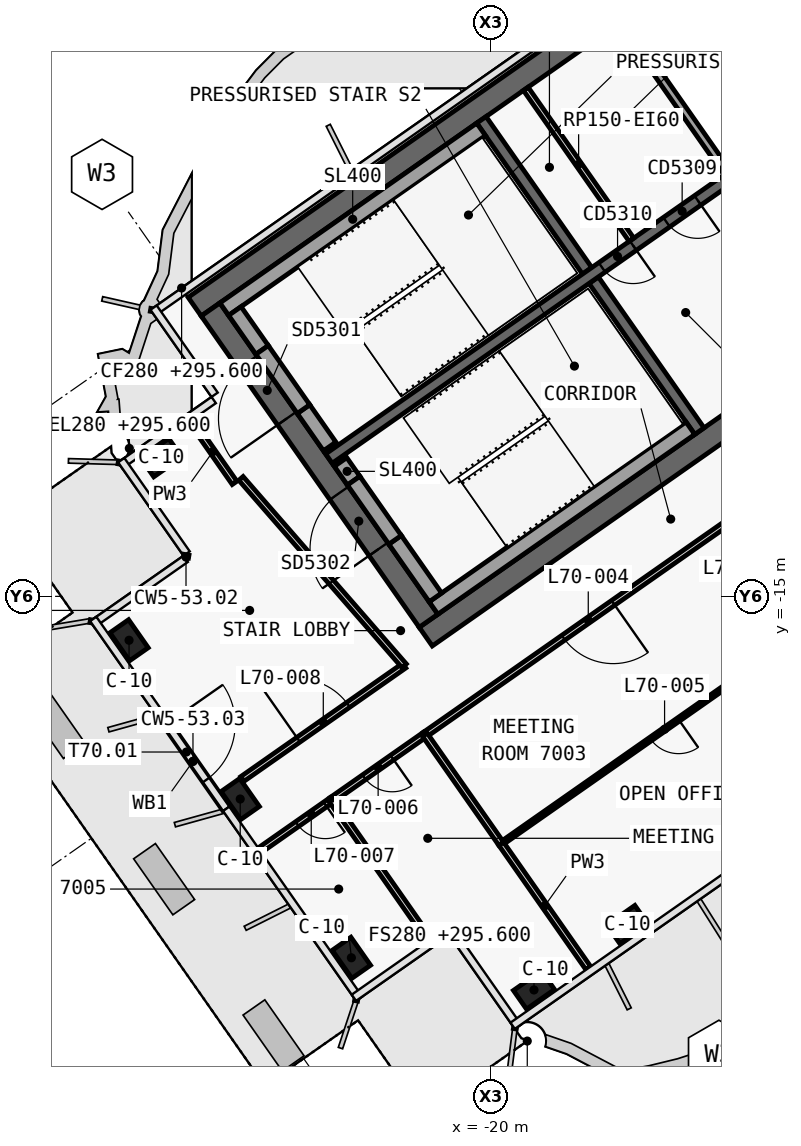
"""IFC4 building model, lengths in metres.
Left out: names, types, materials, properties, quantities, classifications, styles, units other than length and angle.
Written with IfcOpenShell. Run it as: python <this file> out.ifc"""

import sys

from ifc_helpers import new_model, si_unit, direction, frame, frame_2d, origin, origin_2d, place, context, subcontext, project, spatial, polyline, rectangle, outline, extrude, element, fill, save


model = new_model("IFC4")
c1 = context("Model", 3, precision=1e-05, world=origin(), true_north=direction((0.0, 1.0)))
c2 = subcontext(c1, "Body", "Model", "MODEL_VIEW")
j1 = project(units=[si_unit("LENGTHUNIT", "METRE"), si_unit("PLANEANGLEUNIT", "RADIAN")], contexts=[c1])
p1 = place(None, origin())
s1 = spatial("IfcSite", under=j1, at=p1, CompositionType="ELEMENT")
p2 = place(p1, origin())
s2 = spatial("IfcBuilding", under=s1, at=p2, CompositionType="ELEMENT")
p3 = place(p2, frame((0.0, 0.0, 295.6)))
s3 = spatial("IfcBuildingStorey", under=s2, at=p3, CompositionType="ELEMENT", Elevation=295.6)
p4 = place(p3, frame((-0.028, 12.066, 0.0), z_axis=(0.0, 0.0, 1.0), x_axis=(-0.819151382952, -0.573577380837, 0.0)))
e1 = element("IfcWall", 1, at=p4, inside=s3, PredefinedType="SHEAR", context=c2, shape_type="SweptSolid", body=[
    extrude(outline(polyline([(33.898, 0.3), (0.42, 0.3), (0.0, -0.3), (33.898, -0.3), (33.898, 0.3)])), origin(), (0.0, 0.0, 1.0), 3.9),
])
p5 = place(p3, frame((-0.028, -0.874, 0.0), z_axis=(0.0, 0.0, 1.0), x_axis=(-0.819150035022, -0.573579305871, 0.0)))
e2 = element("IfcWall", 2, at=p5, inside=s3, PredefinedType="SHEAR", context=c2, shape_type="SweptSolid", body=[
    extrude(outline(polyline([(26.476, 0.3), (0.42, 0.3), (0.0, -0.3), (26.476, -0.3), (26.476, 0.3)])), origin(), (0.0, 0.0, 1.0), 3.9),
])
p6 = place(p5, frame((2.976, 0.0, 0.0)))
e3 = element("IfcOpeningElement", 3, at=p6, cuts=e2, PredefinedType="OPENING", context=c2, shape_type="SweptSolid", body=[
    extrude(rectangle(XDim=2.4, YDim=2.1, at=frame_2d((1.2, 1.05))), frame((0.0, 0.31, 0.0), z_axis=(0.0, -1.0, 0.0), x_axis=(1.0, 0.0, 0.0)), (0.0, 0.0, 1.0), 0.62),
])
p7 = place(p5, frame((11.776, 0.0, 0.0)))
e4 = element("IfcOpeningElement", 4, at=p7, cuts=e2, PredefinedType="OPENING", context=c2, shape_type="SweptSolid", body=[
    extrude(rectangle(XDim=2.4, YDim=2.1, at=frame_2d((1.2, 1.05))), frame((0.0, 0.31, 0.0), z_axis=(0.0, -1.0, 0.0), x_axis=(1.0, 0.0, 0.0)), (0.0, 0.0, 1.0), 0.62),
])
p8 = place(p3, frame((-21.642, -15.642, 0.0), z_axis=(0.0, 0.0, 1.0), x_axis=(-0.573586866468, 0.819144740944, 0.0)))
e5 = element("IfcWall", 5, at=p8, inside=s3, PredefinedType="SHEAR", context=c2, shape_type="SweptSolid", body=[
    extrude(outline(polyline([(0.0, 0.3), (0.0, -0.3), (10.0, -0.3), (10.0, 0.3), (0.0, 0.3)])), origin(), (0.0, 0.0, 1.0), 3.9),
])
p9 = place(p8, frame((6.5, 0.0, 0.0)))
e6 = element("IfcOpeningElement", 6, at=p9, cuts=e5, PredefinedType="OPENING", context=c2, shape_type="SweptSolid", body=[
    extrude(rectangle(XDim=1.8, YDim=2.1, at=frame_2d((0.9, 1.05))), frame((0.0, 0.31, 0.0), z_axis=(0.0, -1.0, 0.0), x_axis=(1.0, 0.0, 0.0)), (0.0, 0.0, 1.0), 0.62),
])
p10 = place(p8, frame((2.3, 0.0, 0.0)))
e7 = element("IfcOpeningElement", 7, at=p10, cuts=e5, PredefinedType="OPENING", context=c2, shape_type="SweptSolid", body=[
    extrude(rectangle(XDim=1.8, YDim=2.1, at=frame_2d((0.9, 1.05))), frame((0.0, 0.31, 0.0), z_axis=(0.0, -1.0, 0.0), x_axis=(1.0, 0.0, 0.0)), (0.0, 0.0, 1.0), 0.62),
])
p11 = place(p3, frame((-14.515, -10.652, 0.0), z_axis=(0.0, 0.0, 1.0), x_axis=(-0.573560315113, 0.819163332265, 0.0)))
e8 = element("IfcWall", 8, at=p11, inside=s3, PredefinedType="SHEAR", context=c2, shape_type="SweptSolid", body=[
    extrude(outline(polyline([(4.85, 0.15), (0.0, 0.15), (0.0, -0.15), (4.85, -0.15), (4.85, 0.15)])), origin(), (0.0, 0.0, 1.0), 3.9),
])
p12 = place(p3, frame((-17.469, -6.433, 0.0), z_axis=(0.0, 0.0, 1.0), x_axis=(-0.573594092424, 0.81913968109, 0.0)))
e9 = element("IfcWall", 9, at=p12, inside=s3, PredefinedType="SHEAR", context=c2, shape_type="SweptSolid", body=[
    extrude(outline(polyline([(4.85, -0.15), (4.85, 0.15), (0.0, 0.15), (0.0, -0.15), (4.85, -0.15)])), origin(), (0.0, 0.0, 1.0), 3.9),
])
p13 = place(p3, frame((-2.638, 3.768, 0.0), z_axis=(0.0, 0.0, 1.0), x_axis=(-0.819155014212, -0.573572194837, 0.0)))
e10 = element("IfcWall", 10, at=p13, inside=s3, PredefinedType="SHEAR", context=c2, shape_type="SweptSolid", body=[
    extrude(outline(polyline([(26.4, 0.15), (0.0, 0.15), (0.0, -0.15), (26.4, -0.15), (26.4, 0.15)])), origin(), (0.0, 0.0, 1.0), 3.9),
])
p14 = place(p13, frame((1.169, 0.0, 0.0)))
e11 = element("IfcOpeningElement", 11, at=p14, cuts=e10, PredefinedType="OPENING", context=c2, shape_type="SweptSolid", body=[
    extrude(rectangle(XDim=1.1, YDim=2.1, at=frame_2d((0.55, 1.05))), frame((0.0, 0.16, 0.0), z_axis=(0.0, -1.0, 0.0), x_axis=(1.0, 0.0, 0.0)), (0.0, 0.0, 1.0), 0.32),
])
p15 = place(p13, frame((3.206, 0.0, 0.0)))
e12 = element("IfcOpeningElement", 12, at=p15, cuts=e10, PredefinedType="OPENING", context=c2, shape_type="SweptSolid", body=[
    extrude(rectangle(XDim=1.1, YDim=2.1, at=frame_2d((0.55, 1.05))), frame((0.0, 0.16, 0.0), z_axis=(0.0, -1.0, 0.0), x_axis=(1.0, 0.0, 0.0)), (0.0, 0.0, 1.0), 0.32),
])
p16 = place(p13, frame((5.244, 0.0, 0.0)))
e13 = element("IfcOpeningElement", 13, at=p16, cuts=e10, PredefinedType="OPENING", context=c2, shape_type="SweptSolid", body=[
    extrude(rectangle(XDim=1.1, YDim=2.1, at=frame_2d((0.55, 1.05))), frame((0.0, 0.16, 0.0), z_axis=(0.0, -1.0, 0.0), x_axis=(1.0, 0.0, 0.0)), (0.0, 0.0, 1.0), 0.32),
])
p17 = place(p13, frame((7.281, 0.0, 0.0)))
e14 = element("IfcOpeningElement", 14, at=p17, cuts=e10, PredefinedType="OPENING", context=c2, shape_type="SweptSolid", body=[
    extrude(rectangle(XDim=1.1, YDim=2.1, at=frame_2d((0.55, 1.05))), frame((0.0, 0.16, 0.0), z_axis=(0.0, -1.0, 0.0), x_axis=(1.0, 0.0, 0.0)), (0.0, 0.0, 1.0), 0.32),
])
p18 = place(p13, frame((9.688, 0.0, 0.0)))
e15 = element("IfcOpeningElement", 15, at=p18, cuts=e10, PredefinedType="OPENING", context=c2, shape_type="SweptSolid", body=[
    extrude(rectangle(XDim=1.1, YDim=2.1, at=frame_2d((0.55, 1.05))), frame((0.0, 0.16, 0.0), z_axis=(0.0, -1.0, 0.0), x_axis=(1.0, 0.0, 0.0)), (0.0, 0.0, 1.0), 0.32),
])
p19 = place(p13, frame((11.863, 0.0, 0.0)))
e16 = element("IfcOpeningElement", 16, at=p19, cuts=e10, PredefinedType="OPENING", context=c2, shape_type="SweptSolid", body=[
    extrude(rectangle(XDim=1.1, YDim=2.1, at=frame_2d((0.55, 1.05))), frame((0.0, 0.16, 0.0), z_axis=(0.0, -1.0, 0.0), x_axis=(1.0, 0.0, 0.0)), (0.0, 0.0, 1.0), 0.32),
])
p20 = place(p13, frame((14.552, 0.0, 0.0)))
e17 = element("IfcOpeningElement", 17, at=p20, cuts=e10, PredefinedType="OPENING", context=c2, shape_type="SweptSolid", body=[
    extrude(rectangle(XDim=1.0, YDim=2.1, at=frame_2d((0.5, 1.05))), frame((0.0, 0.16, 0.0), z_axis=(0.0, -1.0, 0.0), x_axis=(1.0, 0.0, 0.0)), (0.0, 0.0, 1.0), 0.32),
])
p21 = place(p13, frame((16.627, 0.0, 0.0)))
e18 = element("IfcOpeningElement", 18, at=p21, cuts=e10, PredefinedType="OPENING", context=c2, shape_type="SweptSolid", body=[
    extrude(rectangle(XDim=1.0, YDim=2.1, at=frame_2d((0.5, 1.05))), frame((0.0, 0.16, 0.0), z_axis=(0.0, -1.0, 0.0), x_axis=(1.0, 0.0, 0.0)), (0.0, 0.0, 1.0), 0.32),
])
for number, where, z_axis, x_axis in (
    (19, (-16.41, -23.637, 0.0), (0.0, 0.0, 1.0), (-0.819, -0.574, 0.0)),
    (20, (-18.867, -25.358, 0.0), (0.0, 0.0, 1.0), (-0.819, -0.574, 0.0)),
    (21, (-28.676, -11.35, 0.0), (0.0, 0.0, 1.0), (-0.819, -0.574, 0.0)),
    (22, (-23.672, -24.51, 0.0), (0.0, 0.0, 1.0), (-0.574, 0.819, 0.0)),
    (23, (-26.598, -20.333, 0.0), (0.0, 0.0, 1.0), (-0.574, 0.819, 0.0)),
    (24, (-29.523, -16.155, 0.0), (0.0, 0.0, 1.0), (-0.574, 0.819, 0.0)),
):
    element("IfcColumn", number, at=place(p3, frame(where, z_axis=z_axis, x_axis=x_axis)), inside=s3, PredefinedType="COLUMN", context=c2, shape_type="SweptSolid", body=[
        extrude(rectangle(XDim=0.9, YDim=0.6, at=origin_2d()), origin(), (0.0, 0.0, 1.0), 3.9),
    ])
p22 = place(p3, frame((-16.302, -5.616, 0.0), z_axis=(0.0, 0.0, 1.0), x_axis=(-0.573560315113, 0.819163332265, 0.0)))
e25 = element("IfcWall", 25, at=p22, inside=s3, PredefinedType="PARTITIONING", context=c2, shape_type="SweptSolid", body=[
    extrude(rectangle(XDim=4.85, YDim=0.15, at=frame_2d((2.425, 0.0))), origin(), (0.0, 0.0, 1.0), 3.62),
])
p23 = place(p3, frame((-12.001, -2.605, 0.0), z_axis=(0.0, 0.0, 1.0), x_axis=(-0.573560315113, 0.819163332265, 0.0)))
e26 = element("IfcWall", 26, at=p23, inside=s3, PredefinedType="SOLIDWALL", context=c2, shape_type="SweptSolid", body=[
    extrude(rectangle(XDim=4.85, YDim=0.2, at=frame_2d((2.425, 0.0))), origin(), (0.0, 0.0, 1.0), 3.9),
])
p24 = place(p3, frame((-13.783, -3.852, 0.0), z_axis=(0.0, 0.0, 1.0), x_axis=(-0.573594092424, 0.81913968109, 0.0)))
e27 = element("IfcWall", 27, at=p24, inside=s3, PredefinedType="SOLIDWALL", context=c2, shape_type="SweptSolid", body=[
    extrude(rectangle(XDim=4.85, YDim=0.2, at=frame_2d((2.425, 0.0))), origin(), (0.0, 0.0, 1.0), 3.9),
])
p25 = place(p3, frame((-20.259, -2.71, 0.0), z_axis=(0.0, 0.0, 1.0), x_axis=(-0.81914849389, -0.573581506813, 0.0)))
e28 = element("IfcWall", 28, at=p25, inside=s3, PredefinedType="SOLIDWALL", context=c2, shape_type="SweptSolid", body=[
    extrude(rectangle(XDim=8.25, YDim=0.4, at=frame_2d((4.125, 0.0))), origin(), (0.0, 0.0, 1.0), 3.62),
])
p26 = place(p3, frame((-24.244, -11.055, 0.0), z_axis=(0.0, 0.0, 1.0), x_axis=(-0.573571582932, 0.819155442668, 0.0)))
e29 = element("IfcWall", 29, at=p26, inside=s3, PredefinedType="SOLIDWALL", context=c2, shape_type="SweptSolid", body=[
    extrude(rectangle(XDim=1.2, YDim=0.4, at=frame_2d((0.6, 0.0))), origin(), (0.0, 0.0, 1.0), 3.62),
])
p27 = place(p3, frame((-26.022, -8.515, 0.0), z_axis=(0.0, 0.0, 1.0), x_axis=(-0.573619628835, 0.819121798889, 0.0)))
e30 = element("IfcWall", 30, at=p27, inside=s3, PredefinedType="SOLIDWALL", context=c2, shape_type="SweptSolid", body=[
    extrude(rectangle(XDim=1.25, YDim=0.4, at=frame_2d((0.625, 0.0))), origin(), (0.0, 0.0, 1.0), 3.62),
])
p28 = place(p3, frame((-24.932, -10.072, 2.15), z_axis=(0.0, 0.0, 1.0), x_axis=(-0.573591692345, 0.819141361715, 0.0)))
e31 = element("IfcWall", 31, at=p28, inside=s3, PredefinedType="SOLIDWALL", context=c2, shape_type="SweptSolid", body=[
    extrude(rectangle(XDim=1.9, YDim=0.4, at=frame_2d((0.95, 0.0))), origin(), (0.0, 0.0, 1.0), 1.47),
])
p29 = place(p3, frame((-14.753, -10.574, 0.0), z_axis=(0.0, 0.0, 1.0), x_axis=(-0.819158229677, -0.573567602601, 0.0)))
e32 = element("IfcWall", 32, at=p29, inside=s3, PredefinedType="SOLIDWALL", context=c2, shape_type="SweptSolid", body=[
    extrude(rectangle(XDim=8.25, YDim=0.4, at=frame_2d((4.125, 0.0))), origin(), (0.0, 0.0, 1.0), 3.62),
])
p30 = place(p3, frame((-21.462, -15.028, 0.0), z_axis=(0.0, 0.0, 1.0), x_axis=(-0.573559770908, 0.819163713305, 0.0)))
e33 = element("IfcWall", 33, at=p30, inside=s3, PredefinedType="SOLIDWALL", context=c2, shape_type="SweptSolid", body=[
    extrude(rectangle(XDim=1.85, YDim=0.4, at=frame_2d((0.925, 0.0))), origin(), (0.0, 0.0, 1.0), 3.62),
])
p31 = place(p3, frame((-23.613, -11.956, 0.0), z_axis=(0.0, 0.0, 1.0), x_axis=(-0.573435029941, 0.819251039936, 0.0)))
e34 = element("IfcWall", 34, at=p31, inside=s3, PredefinedType="SOLIDWALL", context=c2, shape_type="SweptSolid", body=[
    extrude(rectangle(XDim=0.6, YDim=0.4, at=frame_2d((0.3, 0.0))), origin(), (0.0, 0.0, 1.0), 3.62),
])
p32 = place(p3, frame((-22.523, -13.512, 2.15), z_axis=(0.0, 0.0, 1.0), x_axis=(-0.573591692345, 0.819141361715, 0.0)))
e35 = element("IfcWall", 35, at=p32, inside=s3, PredefinedType="SOLIDWALL", context=c2, shape_type="SweptSolid", body=[
    extrude(rectangle(XDim=1.9, YDim=0.4, at=frame_2d((0.95, 0.0))), origin(), (0.0, 0.0, 1.0), 1.47),
])
p33 = place(p3, frame((-28.698, -18.117, 0.0), z_axis=(0.0, 0.0, 1.0), x_axis=(0.57360481557, -0.819132172213, 0.0)))
e36 = element("IfcWall", 36, at=p33, inside=s3, PredefinedType="SOLIDWALL", context=c2, shape_type="SweptSolid", body=[
    extrude(rectangle(XDim=2.99, YDim=0.2, at=frame_2d((1.495, 0.0))), origin(), (0.0, 0.0, 1.0), 3.62),
])
p34 = place(p33, frame((0.295, 0.0, 0.0)))
e37 = element("IfcOpeningElement", 37, at=p34, cuts=e36, PredefinedType="OPENING", context=c2, shape_type="SweptSolid", body=[
    extrude(rectangle(XDim=1.8, YDim=2.4, at=frame_2d((0.9, 1.2))), frame((0.0, 0.11, 0.0), z_axis=(0.0, -1.0, 0.0), x_axis=(1.0, 0.0, 0.0)), (0.0, 0.0, 1.0), 0.22),
])
p35 = place(p3, frame((-26.54, -19.804, 0.0), z_axis=(0.0, 0.0, 1.0), x_axis=(0.819163496387, 0.573560080713, 0.0)))
e38 = element("IfcWall", 38, at=p35, inside=s3, PredefinedType="PARTITIONING", context=c2, shape_type="SweptSolid", body=[
    extrude(rectangle(XDim=5.197, YDim=0.15, at=frame_2d((2.598, 0.0))), origin(), (0.0, 0.0, 1.0), 3.05),
])
p36 = place(p35, frame((1.799, 0.0, 0.0)))
e39 = element("IfcOpeningElement", 39, at=p36, cuts=e38, PredefinedType="OPENING", context=c2, shape_type="SweptSolid", body=[
    extrude(rectangle(XDim=1.6, YDim=2.1, at=frame_2d((0.8, 1.05))), frame((0.0, 0.085, 0.0), z_axis=(0.0, -1.0, 0.0), x_axis=(1.0, 0.0, 0.0)), (0.0, 0.0, 1.0), 0.17),
])
p37 = place(p3, frame((-13.137, -12.617, 0.0), z_axis=(0.0, 0.0, 1.0), x_axis=(-0.819156568366, -0.573569975245, 0.0)))
e40 = element("IfcWall", 40, at=p37, inside=s3, PredefinedType="PARTITIONING", context=c2, shape_type="SweptSolid", body=[
    extrude(rectangle(XDim=10.504, YDim=0.15, at=frame_2d((5.252, 0.0))), origin(), (0.0, 0.0, 1.0), 3.05),
])
p38 = place(p37, frame((4.452, 0.0, 0.0)))
e41 = element("IfcOpeningElement", 41, at=p38, cuts=e40, PredefinedType="OPENING", context=c2, shape_type="SweptSolid", body=[
    extrude(rectangle(XDim=1.6, YDim=2.1, at=frame_2d((0.8, 1.05))), frame((0.0, 0.085, 0.0), z_axis=(0.0, -1.0, 0.0), x_axis=(1.0, 0.0, 0.0)), (0.0, 0.0, 1.0), 0.17),
])
p39 = place(p3, frame((-21.738, -18.639, 0.0), z_axis=(0.0, 0.0, 1.0), x_axis=(-0.81916700466, -0.573555070134, 0.0)))
e42 = element("IfcWall", 42, at=p39, inside=s3, PredefinedType="PARTITIONING", context=c2, shape_type="SweptSolid", body=[
    extrude(rectangle(XDim=3.004, YDim=0.15, at=frame_2d((1.502, 0.0))), origin(), (0.0, 0.0, 1.0), 3.05),
])
p40 = place(p39, frame((1.052, 0.0, 0.0)))
e43 = element("IfcOpeningElement", 43, at=p40, cuts=e42, PredefinedType="OPENING", context=c2, shape_type="SweptSolid", body=[
    extrude(rectangle(XDim=0.9, YDim=2.1, at=frame_2d((0.45, 1.05))), frame((0.0, 0.085, 0.0), z_axis=(0.0, -1.0, 0.0), x_axis=(1.0, 0.0, 0.0)), (0.0, 0.0, 1.0), 0.17),
])
p41 = place(p3, frame((-24.196, -20.36, 0.0), z_axis=(0.0, 0.0, 1.0), x_axis=(-0.819172126429, -0.573547755014, 0.0)))
e44 = element("IfcWall", 44, at=p41, inside=s3, PredefinedType="PARTITIONING", context=c2, shape_type="SweptSolid", body=[
    extrude(rectangle(XDim=2.302, YDim=0.15, at=frame_2d((1.151, 0.0))), origin(), (0.0, 0.0, 1.0), 3.0),
])
p42 = place(p41, frame((0.201, 0.0, 0.0)))
e45 = element("IfcOpeningElement", 45, at=p42, cuts=e44, PredefinedType="OPENING", context=c2, shape_type="SweptSolid", body=[
    extrude(rectangle(XDim=0.9, YDim=2.1, at=frame_2d((0.45, 1.05))), frame((0.0, 0.085, 0.0), z_axis=(0.0, -1.0, 0.0), x_axis=(1.0, 0.0, 0.0)), (0.0, 0.0, 1.0), 0.17),
])
p43 = place(p3, frame((-26.746, -12.014, 0.0), z_axis=(0.0, 0.0, 1.0), x_axis=(-0.573568836472, 0.819157365729, 0.0)))
e46 = element("IfcWall", 46, at=p43, inside=s3, PredefinedType="PARTITIONING", context=c2, shape_type="SweptSolid", body=[
    extrude(rectangle(XDim=2.0, YDim=0.15, at=frame_2d((1.0, 0.0))), origin(), (0.0, 0.0, 1.0), 3.05),
])
p44 = place(p3, frame((-22.284, -16.826, 0.0), z_axis=(0.0, 0.0, 1.0), x_axis=(-0.656758142177, 0.754101281449, 0.0)))
e47 = element("IfcWall", 47, at=p44, inside=s3, PredefinedType="PARTITIONING", context=c2, shape_type="SweptSolid", body=[
    extrude(rectangle(XDim=6.539, YDim=0.15, at=frame_2d((3.269, 0.0))), origin(), (0.0, 0.0, 1.0), 3.62),
])
p45 = place(p3, frame((-11.131, -15.486, 0.0), z_axis=(0.0, 0.0, 1.0), x_axis=(-0.819155448096, -0.573571575181, 0.0)))
e48 = element("IfcWall", 48, at=p45, inside=s3, PredefinedType="PARTITIONING", context=c2, shape_type="SweptSolid", body=[
    extrude(rectangle(XDim=10.5, YDim=0.1, at=frame_2d((5.25, 0.0))), origin(), (0.0, 0.0, 1.0), 3.05),
])
p46 = place(p45, frame((4.8, 0.0, 0.0)))
e49 = element("IfcOpeningElement", 49, at=p46, cuts=e48, PredefinedType="OPENING", context=c2, shape_type="SweptSolid", body=[
    extrude(rectangle(XDim=0.9, YDim=2.1, at=frame_2d((0.45, 1.05))), frame((0.0, 0.06, 0.0), z_axis=(0.0, -1.0, 0.0), x_axis=(1.0, 0.0, 0.0)), (0.0, 0.0, 1.0), 0.12),
])
p47 = place(p3, frame((-17.438, -24.784, 0.0), z_axis=(0.0, 0.0, 1.0), x_axis=(-0.573560675104, 0.819163080207, 0.0)))
e50 = element("IfcWall", 50, at=p47, inside=s3, PredefinedType="PARTITIONING", context=c2, shape_type="SweptSolid", body=[
    extrude(rectangle(XDim=3.999, YDim=0.15, at=frame_2d((2.0, 0.0))), origin(), (0.0, 0.0, 1.0), 3.0),
])
p48 = place(p3, frame((-19.732, -21.508, 0.0), z_axis=(0.0, 0.0, 1.0), x_axis=(-0.573551294295, 0.819169648371, 0.0)))
e51 = element("IfcWall", 51, at=p48, inside=s3, PredefinedType="PARTITIONING", context=c2, shape_type="SweptSolid", body=[
    extrude(rectangle(XDim=3.5, YDim=0.15, at=frame_2d((1.75, 0.0))), origin(), (0.0, 0.0, 1.0), 3.62),
])
p49 = place(p3, frame((-21.616, -24.048, 0.0), z_axis=(0.0, 0.0, 1.0), x_axis=(-0.573560650686, 0.819163097304, 0.0)))
e52 = element("IfcWall", 52, at=p49, inside=s3, PredefinedType="PARTITIONING", context=c2, shape_type="SweptSolid", body=[
    extrude(rectangle(XDim=4.5, YDim=0.15, at=frame_2d((2.25, 0.0))), origin(), (0.0, 0.0, 1.0), 3.62),
])
p50 = place(p20, origin())
e53 = element("IfcDoor", 53, at=p50, inside=s3, OperationType="SINGLE_SWING_RIGHT", PredefinedType="DOOR", context=c2, shape_type="SweptSolid", body=[
    extrude(rectangle(XDim=1.0, YDim=2.1, at=frame_2d((0.5, 1.05))), frame((0.0, 0.025, 0.0), z_axis=(0.0, -1.0, 0.0), x_axis=(1.0, 0.0, 0.0)), (0.0, 0.0, 1.0), 0.05),
])
fill(e17, e53)
p51 = place(p21, origin())
e54 = element("IfcDoor", 54, at=p51, inside=s3, OperationType="SINGLE_SWING_RIGHT", PredefinedType="DOOR", context=c2, shape_type="SweptSolid", body=[
    extrude(rectangle(XDim=1.0, YDim=2.1, at=frame_2d((0.5, 1.05))), frame((0.0, 0.025, 0.0), z_axis=(0.0, -1.0, 0.0), x_axis=(1.0, 0.0, 0.0)), (0.0, 0.0, 1.0), 0.05),
])
fill(e18, e54)
p52 = place(p9, origin())
e55 = element("IfcDoor", 55, at=p52, inside=s3, OperationType="DOUBLE_DOOR_SINGLE_SWING", PredefinedType="DOOR", context=c2, shape_type="SweptSolid", body=[
    extrude(rectangle(XDim=1.8, YDim=2.1, at=frame_2d((0.9, 1.05))), frame((0.0, 0.025, 0.0), z_axis=(0.0, -1.0, 0.0), x_axis=(1.0, 0.0, 0.0)), (0.0, 0.0, 1.0), 0.05),
])
fill(e6, e55)
p53 = place(p10, origin())
e56 = element("IfcDoor", 56, at=p53, inside=s3, OperationType="DOUBLE_DOOR_SINGLE_SWING", PredefinedType="DOOR", context=c2, shape_type="SweptSolid", body=[
    extrude(rectangle(XDim=1.8, YDim=2.1, at=frame_2d((0.9, 1.05))), frame((0.0, 0.025, 0.0), z_axis=(0.0, -1.0, 0.0), x_axis=(1.0, 0.0, 0.0)), (0.0, 0.0, 1.0), 0.05),
])
fill(e7, e56)
p54 = place(p34, origin())
e57 = element("IfcDoor", 57, at=p54, inside=s3, OperationType="DOUBLE_DOOR_DOUBLE_SWING", PredefinedType="DOOR", context=c2, shape_type="SweptSolid", body=[
    extrude(rectangle(XDim=1.8, YDim=2.4, at=frame_2d((0.9, 1.2))), frame((0.0, 0.025, 0.0), z_axis=(0.0, -1.0, 0.0), x_axis=(1.0, 0.0, 0.0)), (0.0, 0.0, 1.0), 0.05),
])
fill(e37, e57)
p55 = place(p38, origin())
e58 = element("IfcDoor", 58, at=p55, inside=s3, OperationType="DOUBLE_DOOR_SINGLE_SWING", PredefinedType="DOOR", context=c2, shape_type="SweptSolid", body=[
    extrude(rectangle(XDim=1.6, YDim=2.1, at=frame_2d((0.8, 1.05))), frame((0.0, 0.025, 0.0), z_axis=(0.0, -1.0, 0.0), x_axis=(1.0, 0.0, 0.0)), (0.0, 0.0, 1.0), 0.05),
])
fill(e41, e58)
p56 = place(p46, origin())
e59 = element("IfcDoor", 59, at=p56, inside=s3, OperationType="SINGLE_SWING_LEFT", PredefinedType="DOOR", context=c2, shape_type="SweptSolid", body=[
    extrude(rectangle(XDim=0.9, YDim=2.1, at=frame_2d((0.45, 1.05))), frame((0.0, 0.025, 0.0), z_axis=(0.0, -1.0, 0.0), x_axis=(1.0, 0.0, 0.0)), (0.0, 0.0, 1.0), 0.05),
])
fill(e49, e59)
p57 = place(p40, origin())
e60 = element("IfcDoor", 60, at=p57, inside=s3, OperationType="SINGLE_SWING_LEFT", PredefinedType="DOOR", context=c2, shape_type="SweptSolid", body=[
    extrude(rectangle(XDim=0.9, YDim=2.1, at=frame_2d((0.45, 1.05))), frame((0.0, 0.025, 0.0), z_axis=(0.0, -1.0, 0.0), x_axis=(1.0, 0.0, 0.0)), (0.0, 0.0, 1.0), 0.05),
])
fill(e43, e60)
p58 = place(p42, origin())
e61 = element("IfcDoor", 61, at=p58, inside=s3, OperationType="SINGLE_SWING_RIGHT", PredefinedType="DOOR", context=c2, shape_type="SweptSolid", body=[
    extrude(rectangle(XDim=0.9, YDim=2.1, at=frame_2d((0.45, 1.05))), frame((0.0, 0.025, 0.0), z_axis=(0.0, -1.0, 0.0), x_axis=(1.0, 0.0, 0.0)), (0.0, 0.0, 1.0), 0.05),
])
fill(e45, e61)
p59 = place(p36, origin())
e62 = element("IfcDoor", 62, at=p59, inside=s3, OperationType="DOUBLE_DOOR_SINGLE_SWING", PredefinedType="DOOR", context=c2, shape_type="SweptSolid", body=[
    extrude(rectangle(XDim=1.6, YDim=2.1, at=frame_2d((0.8, 1.05))), frame((0.0, 0.025, 0.0), z_axis=(0.0, -1.0, 0.0), x_axis=(1.0, 0.0, 0.0)), (0.0, 0.0, 1.0), 0.05),
])
fill(e39, e62)
save(model, sys.argv[1])
